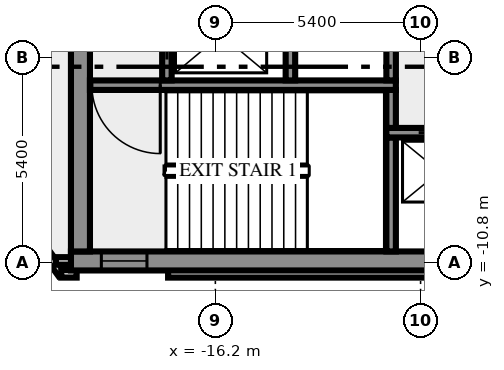
"""IFC4 building model, lengths in metres.
Left out: names, types, materials, properties, quantities, classifications, styles, units other than length and angle.
Written with IfcOpenShell. Run it as: python <this file> out.ifc"""

import sys

from ifc_helpers import new_model, si_unit, direction, frame, frame_2d, origin, place, context, subcontext, project, spatial, rectangle, extrude, element, fill, save


model = new_model("IFC4")
c1 = context("Model", 3, precision=1e-05, world=origin(), true_north=direction((0.0, 1.0)))
c2 = subcontext(c1, "Body", "Model", "MODEL_VIEW")
j1 = project(units=[si_unit("LENGTHUNIT", "METRE"), si_unit("PLANEANGLEUNIT", "RADIAN")], contexts=[c1])
p1 = place(None, origin())
s1 = spatial("IfcSite", under=j1, at=p1, CompositionType="ELEMENT")
p2 = place(p1, origin())
s2 = spatial("IfcBuilding", under=s1, at=p2, CompositionType="ELEMENT")
p3 = place(p2, frame((0.0, 0.0, 71.0)))
s3 = spatial("IfcBuildingStorey", under=s2, at=p3, CompositionType="ELEMENT", Elevation=71.0)
p4 = place(p3, frame((-21.833, -8.909, 0.0), z_axis=(0.0, 0.0, 1.0), x_axis=(0.587766567315, -0.809030569476, 0.0)))
e1 = element("IfcWall", 1, at=p4, inside=s3, PredefinedType="SOLIDWALL", context=c2, shape_type="SweptSolid", body=[
    extrude(rectangle(XDim=2.688, YDim=0.2, at=frame_2d((1.344, 0.0))), origin(), (0.0, 0.0, 1.0), 3.65),
])
p5 = place(p3, frame((-20.256, -11.088, 0.0), z_axis=(0.0, 0.0, 1.0), x_axis=(1.0, 0.0, 0.0)))
e2 = element("IfcWall", 2, at=p5, inside=s3, PredefinedType="SOLIDWALL", context=c2, shape_type="SweptSolid", body=[
    extrude(rectangle(XDim=0.406, YDim=0.2, at=frame_2d((0.203, 0.0))), origin(), (0.0, 0.0, 1.0), 3.65),
])
p6 = place(p3, frame((-17.444, -11.088, 0.0), z_axis=(0.0, 0.0, 1.0), x_axis=(1.0, 0.0, 0.0)))
e3 = element("IfcWall", 3, at=p6, inside=s3, PredefinedType="SOLIDWALL", context=c2, shape_type="SweptSolid", body=[
    extrude(rectangle(XDim=34.888, YDim=0.2, at=frame_2d((17.444, 0.0))), origin(), (0.0, 0.0, 1.0), 3.65),
])
p7 = place(p3, frame((-19.98, -10.75, 0.0), z_axis=(0.0, 0.0, 1.0), x_axis=(-1.0, 0.0, 0.0)))
e4 = element("IfcWall", 4, at=p7, inside=s3, PredefinedType="SOLIDWALL", context=c2, shape_type="SweptSolid", body=[
    extrude(rectangle(XDim=0.417, YDim=0.2, at=frame_2d((0.208, 0.0))), origin(), (0.0, 0.0, 1.0), 3.65),
])
p8 = place(p3, frame((-20.0, -10.75, 0.0), z_axis=(0.0, 0.0, 1.0), x_axis=(1.0, 0.0, 0.0)))
e5 = element("IfcWall", 5, at=p8, inside=s3, PredefinedType="SHEAR", context=c2, shape_type="SweptSolid", body=[
    extrude(rectangle(XDim=40.0, YDim=0.5, at=frame_2d((20.0, 0.0))), origin(), (0.0, 0.0, 1.0), 3.65),
])
p9 = place(p8, frame((0.8, 0.0, 1.0)))
e6 = element("IfcOpeningElement", 6, at=p9, cuts=e5, PredefinedType="OPENING", context=c2, shape_type="SweptSolid", body=[
    extrude(rectangle(XDim=1.2, YDim=1.2, at=frame_2d((0.6, 0.6))), frame((0.0, 0.26, 0.0), z_axis=(0.0, -1.0, 0.0), x_axis=(1.0, 0.0, 0.0)), (0.0, 0.0, 1.0), 0.52),
])
p10 = place(p8, frame((38.0, 0.0, 1.0)))
e7 = element("IfcOpeningElement", 7, at=p10, cuts=e5, PredefinedType="OPENING", context=c2, shape_type="SweptSolid", body=[
    extrude(rectangle(XDim=1.2, YDim=1.2, at=frame_2d((0.6, 0.6))), frame((0.0, 0.26, 0.0), z_axis=(0.0, -1.0, 0.0), x_axis=(1.0, 0.0, 0.0)), (0.0, 0.0, 1.0), 0.52),
])
p11 = place(p3, frame((-19.75, -10.5, 0.0), z_axis=(0.0, 0.0, 1.0), x_axis=(0.0, 1.0, 0.0)))
e8 = element("IfcWall", 8, at=p11, inside=s3, PredefinedType="SHEAR", context=c2, shape_type="SweptSolid", body=[
    extrude(rectangle(XDim=8.8, YDim=0.5, at=frame_2d((4.4, 0.0))), origin(), (0.0, 0.0, 1.0), 3.65),
])
p12 = place(p3, frame((-11.575, -10.5, 0.0), z_axis=(0.0, 0.0, 1.0), x_axis=(0.0, 1.0, 0.0)))
e9 = element("IfcWall", 9, at=p12, inside=s3, PredefinedType="SHEAR", context=c2, shape_type="SweptSolid", body=[
    extrude(rectangle(XDim=3.0, YDim=0.25, at=frame_2d((1.5, 0.0))), origin(), (0.0, 0.0, 1.0), 3.65),
])
p13 = place(p3, frame((11.7, -7.375, 0.0), z_axis=(0.0, 0.0, 1.0), x_axis=(-1.0, 0.0, 0.0)))
e10 = element("IfcWall", 10, at=p13, inside=s3, PredefinedType="SHEAR", context=c2, shape_type="SweptSolid", body=[
    extrude(rectangle(XDim=23.4, YDim=0.25, at=frame_2d((11.7, 0.0))), origin(), (0.0, 0.0, 1.0), 3.65),
])
p14 = place(p13, frame((21.45, 0.0, 0.0)))
e11 = element("IfcOpeningElement", 11, at=p14, cuts=e10, PredefinedType="OPENING", context=c2, shape_type="SweptSolid", body=[
    extrude(rectangle(XDim=1.1, YDim=2.1, at=frame_2d((0.55, 1.05))), frame((0.0, 0.135, 0.0), z_axis=(0.0, -1.0, 0.0), x_axis=(1.0, 0.0, 0.0)), (0.0, 0.0, 1.0), 0.27),
])
p15 = place(p13, frame((18.95, 0.0, 0.0)))
e12 = element("IfcOpeningElement", 12, at=p15, cuts=e10, PredefinedType="OPENING", context=c2, shape_type="SweptSolid", body=[
    extrude(rectangle(XDim=1.1, YDim=2.1, at=frame_2d((0.55, 1.05))), frame((0.0, 0.135, 0.0), z_axis=(0.0, -1.0, 0.0), x_axis=(1.0, 0.0, 0.0)), (0.0, 0.0, 1.0), 0.27),
])
p16 = place(p13, frame((16.45, 0.0, 0.0)))
e13 = element("IfcOpeningElement", 13, at=p16, cuts=e10, PredefinedType="OPENING", context=c2, shape_type="SweptSolid", body=[
    extrude(rectangle(XDim=1.1, YDim=2.1, at=frame_2d((0.55, 1.05))), frame((0.0, 0.135, 0.0), z_axis=(0.0, -1.0, 0.0), x_axis=(1.0, 0.0, 0.0)), (0.0, 0.0, 1.0), 0.27),
])
p17 = place(p13, frame((14.65, 0.0, 0.0)))
e14 = element("IfcOpeningElement", 14, at=p17, cuts=e10, PredefinedType="OPENING", context=c2, shape_type="SweptSolid", body=[
    extrude(rectangle(XDim=0.8, YDim=2.1, at=frame_2d((0.4, 1.05))), frame((0.0, 0.135, 0.0), z_axis=(0.0, -1.0, 0.0), x_axis=(1.0, 0.0, 0.0)), (0.0, 0.0, 1.0), 0.27),
])
p18 = place(p13, frame((12.8, 0.0, 0.0)))
e15 = element("IfcOpeningElement", 15, at=p18, cuts=e10, PredefinedType="OPENING", context=c2, shape_type="SweptSolid", body=[
    extrude(rectangle(XDim=0.9, YDim=2.1, at=frame_2d((0.45, 1.05))), frame((0.0, 0.135, 0.0), z_axis=(0.0, -1.0, 0.0), x_axis=(1.0, 0.0, 0.0)), (0.0, 0.0, 1.0), 0.27),
])
p19 = place(p13, frame((10.7, 0.0, 0.0)))
e16 = element("IfcOpeningElement", 16, at=p19, cuts=e10, PredefinedType="OPENING", context=c2, shape_type="SweptSolid", body=[
    extrude(rectangle(XDim=0.9, YDim=2.1, at=frame_2d((0.45, 1.05))), frame((0.0, 0.135, 0.0), z_axis=(0.0, -1.0, 0.0), x_axis=(1.0, 0.0, 0.0)), (0.0, 0.0, 1.0), 0.27),
])
p20 = place(p3, frame((-11.575, -7.25, 0.0), z_axis=(0.0, 0.0, 1.0), x_axis=(0.0, 1.0, 0.0)))
e17 = element("IfcWall", 17, at=p20, inside=s3, PredefinedType="SHEAR", context=c2, shape_type="SweptSolid", body=[
    extrude(rectangle(XDim=1.0, YDim=0.25, at=frame_2d((0.5, 0.0))), origin(), (0.0, 0.0, 1.0), 3.65),
])
p21 = place(p3, frame((-11.45, -6.125, 0.0), z_axis=(0.0, 0.0, 1.0), x_axis=(-1.0, 0.0, 0.0)))
e18 = element("IfcWall", 18, at=p21, inside=s3, PredefinedType="SHEAR", context=c2, shape_type="SweptSolid", body=[
    extrude(rectangle(XDim=8.05, YDim=0.25, at=frame_2d((4.025, 0.0))), origin(), (0.0, 0.0, 1.0), 3.65),
])
p22 = place(p21, frame((6.2, 0.0, 0.0)))
e19 = element("IfcOpeningElement", 19, at=p22, cuts=e18, PredefinedType="OPENING", context=c2, shape_type="SweptSolid", body=[
    extrude(rectangle(XDim=1.8, YDim=2.1, at=frame_2d((0.9, 1.05))), frame((0.0, 0.135, 0.0), z_axis=(0.0, -1.0, 0.0), x_axis=(1.0, 0.0, 0.0)), (0.0, 0.0, 1.0), 0.27),
])
p23 = place(p3, frame((-17.475, -6.0, 0.0), z_axis=(0.0, 0.0, 1.0), x_axis=(0.0, 1.0, 0.0)))
e20 = element("IfcWall", 20, at=p23, inside=s3, PredefinedType="SHEAR", context=c2, shape_type="SweptSolid", body=[
    extrude(rectangle(XDim=4.3, YDim=0.25, at=frame_2d((2.15, 0.0))), origin(), (0.0, 0.0, 1.0), 3.65),
])
p24 = place(p23, frame((0.55, 0.0, 0.0)))
e21 = element("IfcOpeningElement", 21, at=p24, cuts=e20, PredefinedType="OPENING", context=c2, shape_type="SweptSolid", body=[
    extrude(rectangle(XDim=1.3, YDim=2.1, at=frame_2d((0.65, 1.05))), frame((0.0, 0.135, 0.0), z_axis=(0.0, -1.0, 0.0), x_axis=(1.0, 0.0, 0.0)), (0.0, 0.0, 1.0), 0.27),
])
for number, where, z_axis, x_axis in (
    (22, (-14.225, -6.0, 0.0), (0.0, 0.0, 1.0), (0.0, 1.0, 0.0)),
    (23, (-11.575, -6.0, 0.0), (0.0, 0.0, 1.0), (0.0, 1.0, 0.0)),
):
    element("IfcWall", number, at=place(p3, frame(where, z_axis=z_axis, x_axis=x_axis)), inside=s3, PredefinedType="SHEAR", context=c2, shape_type="SweptSolid", body=[
        extrude(rectangle(XDim=1.75, YDim=0.25, at=frame_2d((0.875, 0.0))), origin(), (0.0, 0.0, 1.0), 3.65),
    ])
p25 = place(p9, origin())
e24 = element("IfcWindow", 24, at=p25, inside=s3, PartitioningType="SINGLE_PANEL", PredefinedType="WINDOW", context=c2, shape_type="SweptSolid", body=[
    extrude(rectangle(XDim=1.2, YDim=1.2, at=frame_2d((0.6, 0.6))), frame((0.0, 0.03, 0.0), z_axis=(0.0, -1.0, 0.0), x_axis=(1.0, 0.0, 0.0)), (0.0, 0.0, 1.0), 0.06),
])
fill(e6, e24)
p26 = place(p14, origin())
e25 = element("IfcDoor", 25, at=p26, inside=s3, OperationType="DOUBLE_DOOR_SLIDING", PredefinedType="DOOR", context=c2, shape_type="SweptSolid", body=[
    extrude(rectangle(XDim=1.1, YDim=2.1, at=frame_2d((0.55, 1.05))), frame((0.0, 0.025, 0.0), z_axis=(0.0, -1.0, 0.0), x_axis=(1.0, 0.0, 0.0)), (0.0, 0.0, 1.0), 0.05),
])
fill(e11, e25)
p27 = place(p22, origin())
e26 = element("IfcDoor", 26, at=p27, inside=s3, OperationType="DOUBLE_DOOR_SINGLE_SWING", PredefinedType="DOOR", context=c2, shape_type="SweptSolid", body=[
    extrude(rectangle(XDim=1.8, YDim=2.1, at=frame_2d((0.9, 1.05))), frame((0.0, 0.025, 0.0), z_axis=(0.0, -1.0, 0.0), x_axis=(1.0, 0.0, 0.0)), (0.0, 0.0, 1.0), 0.05),
])
fill(e19, e26)
p28 = place(p24, origin())
e27 = element("IfcDoor", 27, at=p28, inside=s3, OperationType="DOUBLE_DOOR_SLIDING", PredefinedType="DOOR", context=c2, shape_type="SweptSolid", body=[
    extrude(rectangle(XDim=1.3, YDim=2.1, at=frame_2d((0.65, 1.05))), frame((0.0, 0.025, 0.0), z_axis=(0.0, -1.0, 0.0), x_axis=(1.0, 0.0, 0.0)), (0.0, 0.0, 1.0), 0.05),
])
fill(e21, e27)
save(model, sys.argv[1])
